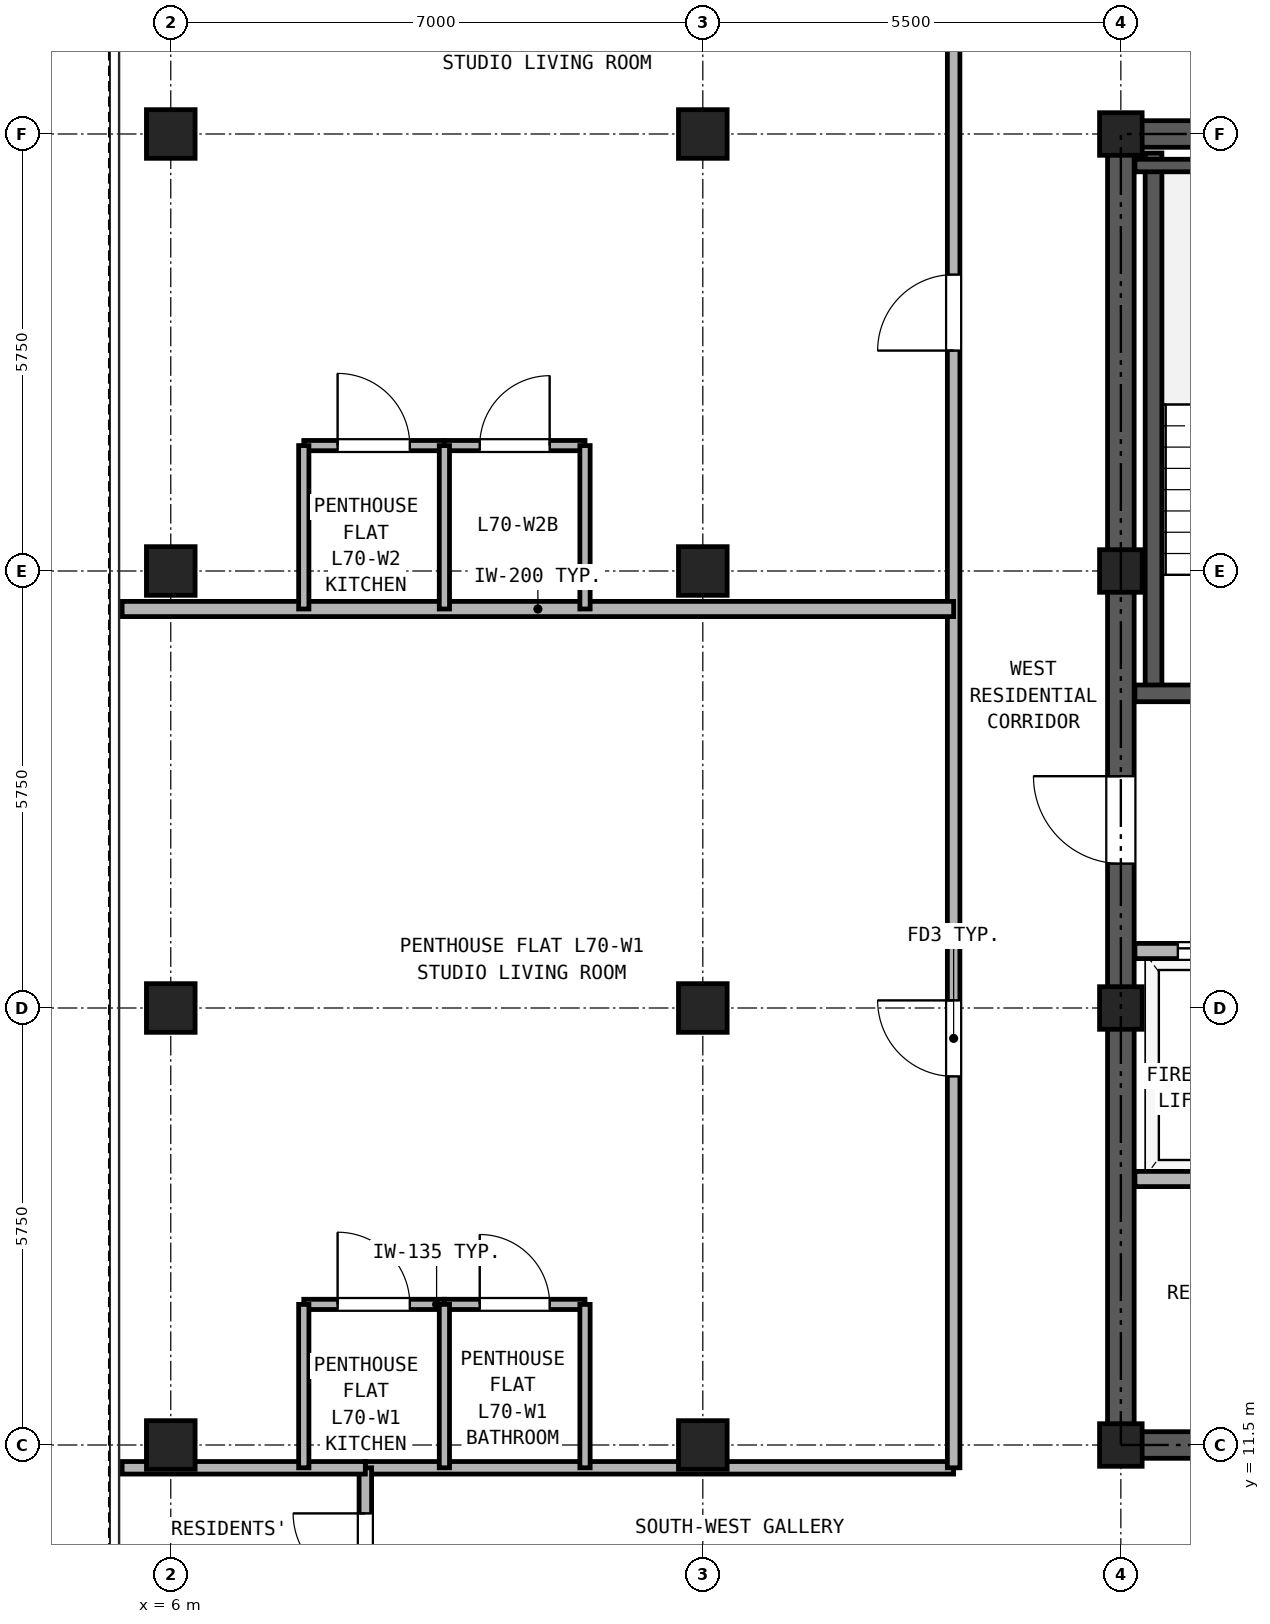
"""IFC4 building model, lengths in metres.
Left out: names, types, materials, properties, quantities, classifications, styles, units other than length and angle.
Written with IfcOpenShell. Run it as: python <this file> out.ifc"""

import sys

from ifc_helpers import new_model, si_unit, direction, frame, frame_2d, origin, origin_2d, place, context, subcontext, project, spatial, rectangle, hollow_rectangle, extrude, source, transform, mapped, element, fill, save


model = new_model("IFC4")
c1 = context("Model", 3, precision=1e-05, world=origin(), true_north=direction((0.0, 1.0)))
c2 = subcontext(c1, "Body", "Model", "MODEL_VIEW")
j1 = project(units=[si_unit("LENGTHUNIT", "METRE"), si_unit("PLANEANGLEUNIT", "RADIAN")], contexts=[c1])
p1 = place(None, origin())
s1 = spatial("IfcSite", under=j1, at=p1, CompositionType="ELEMENT")
p2 = place(p1, origin())
s2 = spatial("IfcBuilding", under=s1, at=p2, CompositionType="ELEMENT")
p3 = place(p2, frame((0.0, 0.0, 245.7)))
s3 = spatial("IfcBuildingStorey", under=s2, at=p3, CompositionType="ELEMENT", Elevation=245.7)
m1 = source(origin(), c2, "Body", "SweptSolid", [
    extrude(hollow_rectangle(XDim=0.64, YDim=0.64, WallThickness=0.035, at=origin_2d()), origin(), (0.0, 0.0, 1.0), 2.98),
])
for number, where, z_axis, x_axis in (
    (1, (6.0, 11.5, 0.0), (0.0, 0.0, 1.0), (1.0, 0.0, 0.0)),
    (2, (6.0, 17.25, 0.0), (0.0, 0.0, 1.0), (1.0, 0.0, 0.0)),
    (3, (6.0, 23.0, 0.0), (0.0, 0.0, 1.0), (1.0, 0.0, 0.0)),
    (4, (6.0, 28.75, 0.0), (0.0, 0.0, 1.0), (1.0, 0.0, 0.0)),
    (5, (13.0, 11.5, 0.0), (0.0, 0.0, 1.0), (1.0, 0.0, 0.0)),
    (6, (13.0, 17.25, 0.0), (0.0, 0.0, 1.0), (1.0, 0.0, 0.0)),
    (7, (13.0, 23.0, 0.0), (0.0, 0.0, 1.0), (1.0, 0.0, 0.0)),
    (8, (13.0, 28.75, 0.0), (0.0, 0.0, 1.0), (1.0, 0.0, 0.0)),
):
    element("IfcColumn", number, at=place(p3, frame(where, z_axis=z_axis, x_axis=x_axis)), inside=s3, PredefinedType="COLUMN", context=c2, shape_type="MappedRepresentation", body=[
        mapped(m1, transform((0.0, 0.0, 0.0), x_axis=(1.0, 0.0, 0.0), y_axis=(0.0, 1.0, 0.0), z_axis=(0.0, 0.0, 1.0), scale=1.0)),
    ])
m2 = source(origin(), c2, "Body", "SweptSolid", [
    extrude(hollow_rectangle(XDim=0.56, YDim=0.56, WallThickness=0.03, at=origin_2d()), origin(), (0.0, 0.0, 1.0), 2.98),
])
for number, where, z_axis, x_axis in (
    (9, (18.5, 11.5, 0.0), (0.0, 0.0, 1.0), (1.0, 0.0, 0.0)),
    (10, (18.5, 17.25, 0.0), (0.0, 0.0, 1.0), (1.0, 0.0, 0.0)),
    (11, (18.5, 23.0, 0.0), (0.0, 0.0, 1.0), (1.0, 0.0, 0.0)),
    (12, (18.5, 28.75, 0.0), (0.0, 0.0, 1.0), (1.0, 0.0, 0.0)),
):
    element("IfcColumn", number, at=place(p3, frame(where, z_axis=z_axis, x_axis=x_axis)), inside=s3, PredefinedType="COLUMN", context=c2, shape_type="MappedRepresentation", body=[
        mapped(m2, transform((0.0, 0.0, 0.0), x_axis=(1.0, 0.0, 0.0), y_axis=(0.0, 1.0, 0.0), z_axis=(0.0, 0.0, 1.0), scale=1.0)),
    ])
p4 = place(p3, frame((18.325, 11.5, 0.0), z_axis=(0.0, 0.0, 1.0), x_axis=(1.0, 0.0, 0.0)))
e13 = element("IfcWall", 13, at=p4, inside=s3, PredefinedType="SHEAR", context=c2, shape_type="SweptSolid", body=[
    extrude(rectangle(XDim=10.35, YDim=0.35, at=frame_2d((5.175, 0.0))), origin(), (0.0, 0.0, 1.0), 2.98),
])
p5 = place(p4, frame((1.775, 0.0, 0.0)))
e14 = element("IfcOpeningElement", 14, at=p5, cuts=e13, PredefinedType="OPENING", context=c2, shape_type="SweptSolid", body=[
    extrude(rectangle(XDim=0.95, YDim=2.15, at=frame_2d((0.475, 1.075))), frame((0.0, 0.185, 0.0), z_axis=(0.0, -1.0, 0.0), x_axis=(1.0, 0.0, 0.0)), (0.0, 0.0, 1.0), 0.37),
])
p6 = place(p4, frame((5.275, 0.0, 0.0)))
e15 = element("IfcOpeningElement", 15, at=p6, cuts=e13, PredefinedType="OPENING", context=c2, shape_type="SweptSolid", body=[
    extrude(rectangle(XDim=0.95, YDim=2.15, at=frame_2d((0.475, 1.075))), frame((0.0, 0.185, 0.0), z_axis=(0.0, -1.0, 0.0), x_axis=(1.0, 0.0, 0.0)), (0.0, 0.0, 1.0), 0.37),
])
p7 = place(p4, frame((8.175, 0.0, 0.0)))
e16 = element("IfcOpeningElement", 16, at=p7, cuts=e13, PredefinedType="OPENING", context=c2, shape_type="SweptSolid", body=[
    extrude(rectangle(XDim=1.1, YDim=2.25, at=frame_2d((0.55, 1.125))), frame((0.0, 0.185, 0.0), z_axis=(0.0, -1.0, 0.0), x_axis=(1.0, 0.0, 0.0)), (0.0, 0.0, 1.0), 0.37),
])
p8 = place(p3, frame((18.325, 28.75, 0.0), z_axis=(0.0, 0.0, 1.0), x_axis=(1.0, 0.0, 0.0)))
e17 = element("IfcWall", 17, at=p8, inside=s3, PredefinedType="SHEAR", context=c2, shape_type="SweptSolid", body=[
    extrude(rectangle(XDim=10.35, YDim=0.35, at=frame_2d((5.175, 0.0))), origin(), (0.0, 0.0, 1.0), 2.98),
])
p9 = place(p8, frame((4.055, 0.0, 0.0)))
e18 = element("IfcOpeningElement", 18, at=p9, cuts=e17, PredefinedType="OPENING", context=c2, shape_type="SweptSolid", body=[
    extrude(rectangle(XDim=0.9, YDim=2.05, at=frame_2d((0.45, 1.025))), frame((0.0, 0.185, 0.0), z_axis=(0.0, -1.0, 0.0), x_axis=(1.0, 0.0, 0.0)), (0.0, 0.0, 1.0), 0.37),
])
p10 = place(p8, frame((5.595, 0.0, 0.0)))
e19 = element("IfcOpeningElement", 19, at=p10, cuts=e17, PredefinedType="OPENING", context=c2, shape_type="SweptSolid", body=[
    extrude(rectangle(XDim=0.9, YDim=2.05, at=frame_2d((0.45, 1.025))), frame((0.0, 0.185, 0.0), z_axis=(0.0, -1.0, 0.0), x_axis=(1.0, 0.0, 0.0)), (0.0, 0.0, 1.0), 0.37),
])
p11 = place(p3, frame((18.5, 11.675, 0.0), z_axis=(0.0, 0.0, 1.0), x_axis=(0.0, 1.0, 0.0)))
e20 = element("IfcWall", 20, at=p11, inside=s3, PredefinedType="SHEAR", context=c2, shape_type="SweptSolid", body=[
    extrude(rectangle(XDim=16.9, YDim=0.35, at=frame_2d((8.45, 0.0))), origin(), (0.0, 0.0, 1.0), 2.98),
])
p12 = place(p11, frame((7.475, 0.0, 0.0)))
e21 = element("IfcOpeningElement", 21, at=p12, cuts=e20, PredefinedType="OPENING", context=c2, shape_type="SweptSolid", body=[
    extrude(rectangle(XDim=1.15, YDim=2.2, at=frame_2d((0.575, 1.1))), frame((0.0, 0.185, 0.0), z_axis=(0.0, -1.0, 0.0), x_axis=(1.0, 0.0, 0.0)), (0.0, 0.0, 1.0), 0.37),
])
p13 = place(p3, frame((18.93, 21.39, 0.0), z_axis=(0.0, 0.0, 1.0), x_axis=(0.0, 1.0, 0.0)))
e22 = element("IfcWall", 22, at=p13, inside=s3, PredefinedType="SOLIDWALL", context=c2, shape_type="SweptSolid", body=[
    extrude(rectangle(XDim=7.11, YDim=0.22, at=frame_2d((3.555, 0.0))), origin(), (0.0, 0.0, 1.0), 2.98),
])
p14 = place(p3, frame((18.685, 28.335, 0.0), z_axis=(0.0, 0.0, 1.0), x_axis=(1.0, 0.0, 0.0)))
e23 = element("IfcWall", 23, at=p14, inside=s3, PredefinedType="PARTITIONING", context=c2, shape_type="SweptSolid", body=[
    extrude(rectangle(XDim=3.425, YDim=0.165, at=frame_2d((1.712, 0.0))), origin(), (0.0, 0.0, 1.0), 2.98),
])
p15 = place(p3, frame((18.685, 21.39, 0.0), z_axis=(0.0, 0.0, 1.0), x_axis=(1.0, 0.0, 0.0)))
e24 = element("IfcWall", 24, at=p15, inside=s3, PredefinedType="SOLIDWALL", context=c2, shape_type="SweptSolid", body=[
    extrude(rectangle(XDim=6.445, YDim=0.22, at=frame_2d((3.222, 0.0))), origin(), (0.0, 0.0, 1.0), 2.98),
])
p16 = place(p15, frame((1.165, 0.0, 0.0)))
e25 = element("IfcOpeningElement", 25, at=p16, cuts=e24, PredefinedType="OPENING", context=c2, shape_type="SweptSolid", body=[
    extrude(rectangle(XDim=1.15, YDim=2.2, at=frame_2d((0.575, 1.1))), frame((0.0, 0.12, 0.0), z_axis=(0.0, -1.0, 0.0), x_axis=(1.0, 0.0, 0.0)), (0.0, 0.0, 1.0), 0.24),
])
p17 = place(p15, frame((4.895, 0.0, 0.0)))
e26 = element("IfcOpeningElement", 26, at=p17, cuts=e24, PredefinedType="OPENING", context=c2, shape_type="SweptSolid", body=[
    extrude(rectangle(XDim=1.1, YDim=2.25, at=frame_2d((0.55, 1.125))), frame((0.0, 0.12, 0.0), z_axis=(0.0, -1.0, 0.0), x_axis=(1.0, 0.0, 0.0)), (0.0, 0.0, 1.0), 0.24),
])
p18 = place(p3, frame((18.685, 18.0, 0.0), z_axis=(0.0, 0.0, 1.0), x_axis=(1.0, 0.0, 0.0)))
e27 = element("IfcWall", 27, at=p18, inside=s3, PredefinedType="PARTITIONING", context=c2, shape_type="SweptSolid", body=[
    extrude(rectangle(XDim=9.63, YDim=0.2, at=frame_2d((4.815, 0.0))), origin(), (0.0, 0.0, 1.0), 2.98),
])
p19 = place(p18, frame((0.565, 0.0, 0.0)))
e28 = element("IfcOpeningElement", 28, at=p19, cuts=e27, PredefinedType="OPENING", context=c2, shape_type="SweptSolid", body=[
    extrude(rectangle(XDim=1.3, YDim=2.3, at=frame_2d((0.65, 1.15))), frame((0.0, 0.11, 0.0), z_axis=(0.0, -1.0, 0.0), x_axis=(1.0, 0.0, 0.0)), (0.0, 0.0, 1.0), 0.22),
])
p20 = place(p18, frame((2.665, 0.0, 0.0)))
e29 = element("IfcOpeningElement", 29, at=p20, cuts=e27, PredefinedType="OPENING", context=c2, shape_type="SweptSolid", body=[
    extrude(rectangle(XDim=1.3, YDim=2.3, at=frame_2d((0.65, 1.15))), frame((0.0, 0.11, 0.0), z_axis=(0.0, -1.0, 0.0), x_axis=(1.0, 0.0, 0.0)), (0.0, 0.0, 1.0), 0.22),
])
p21 = place(p18, frame((7.165, 0.0, 0.0)))
e30 = element("IfcOpeningElement", 30, at=p21, cuts=e27, PredefinedType="OPENING", context=c2, shape_type="SweptSolid", body=[
    extrude(rectangle(XDim=1.0, YDim=2.15, at=frame_2d((0.5, 1.075))), frame((0.0, 0.11, 0.0), z_axis=(0.0, -1.0, 0.0), x_axis=(1.0, 0.0, 0.0)), (0.0, 0.0, 1.0), 0.22),
])
p22 = place(p3, frame((18.685, 15.0, 0.0), z_axis=(0.0, 0.0, 1.0), x_axis=(1.0, 0.0, 0.0)))
e31 = element("IfcWall", 31, at=p22, inside=s3, PredefinedType="PARTITIONING", context=c2, shape_type="SweptSolid", body=[
    extrude(rectangle(XDim=9.63, YDim=0.2, at=frame_2d((4.815, 0.0))), origin(), (0.0, 0.0, 1.0), 2.98),
])
p23 = place(p3, frame((8.56, 11.2, 0.0), z_axis=(0.0, 0.0, 1.0), x_axis=(1.0, 0.0, 0.0)))
e32 = element("IfcWall", 32, at=p23, inside=s3, PredefinedType="PARTITIONING", context=c2, shape_type="SweptSolid", body=[
    extrude(rectangle(XDim=7.74, YDim=0.165, at=frame_2d((3.87, 0.0))), origin(), (0.0, 0.0, 1.0), 2.98),
])
p24 = place(p3, frame((8.56, 9.2, 0.0), z_axis=(0.0, 0.0, 1.0), x_axis=(0.0, 1.0, 0.0)))
e33 = element("IfcWall", 33, at=p24, inside=s3, PredefinedType="PARTITIONING", context=c2, shape_type="SweptSolid", body=[
    extrude(rectangle(XDim=2.0, YDim=0.165, at=frame_2d((1.0, 0.0))), origin(), (0.0, 0.0, 1.0), 2.98),
])
p25 = place(p24, frame((0.45, 0.0, 0.0)))
e34 = element("IfcOpeningElement", 34, at=p25, cuts=e33, PredefinedType="OPENING", context=c2, shape_type="SweptSolid", body=[
    extrude(rectangle(XDim=0.95, YDim=2.15, at=frame_2d((0.475, 1.075))), frame((0.0, 0.093, 0.0), z_axis=(0.0, -1.0, 0.0), x_axis=(1.0, 0.0, 0.0)), (0.0, 0.0, 1.0), 0.185),
])
p26 = place(p3, frame((16.3, 11.2, 0.0), z_axis=(0.0, 0.0, 1.0), x_axis=(0.0, 1.0, 0.0)))
e35 = element("IfcWall", 35, at=p26, inside=s3, PredefinedType="PARTITIONING", context=c2, shape_type="SweptSolid", body=[
    extrude(rectangle(XDim=23.94, YDim=0.165, at=frame_2d((11.97, 0.0))), origin(), (0.0, 0.0, 1.0), 2.98),
])
p27 = place(p26, frame((5.15, 0.0, 0.0)))
e36 = element("IfcOpeningElement", 36, at=p27, cuts=e35, PredefinedType="OPENING", context=c2, shape_type="SweptSolid", body=[
    extrude(rectangle(XDim=1.0, YDim=2.15, at=frame_2d((0.5, 1.075))), frame((0.0, 0.093, 0.0), z_axis=(0.0, -1.0, 0.0), x_axis=(1.0, 0.0, 0.0)), (0.0, 0.0, 1.0), 0.185),
])
p28 = place(p26, frame((14.7, 0.0, 0.0)))
e37 = element("IfcOpeningElement", 37, at=p28, cuts=e35, PredefinedType="OPENING", context=c2, shape_type="SweptSolid", body=[
    extrude(rectangle(XDim=1.0, YDim=2.15, at=frame_2d((0.5, 1.075))), frame((0.0, 0.093, 0.0), z_axis=(0.0, -1.0, 0.0), x_axis=(1.0, 0.0, 0.0)), (0.0, 0.0, 1.0), 0.185),
])
p29 = place(p3, frame((5.36, 11.2, 0.0), z_axis=(0.0, 0.0, 1.0), x_axis=(1.0, 0.0, 0.0)))
e38 = element("IfcWall", 38, at=p29, inside=s3, PredefinedType="PARTITIONING", context=c2, shape_type="SweptSolid", body=[
    extrude(rectangle(XDim=3.2, YDim=0.165, at=frame_2d((1.6, 0.0))), origin(), (0.0, 0.0, 1.0), 2.98),
])
p30 = place(p3, frame((7.75, 13.35, 0.0), z_axis=(0.0, 0.0, 1.0), x_axis=(1.0, 0.0, 0.0)))
e39 = element("IfcWall", 39, at=p30, inside=s3, PredefinedType="PARTITIONING", context=c2, shape_type="SweptSolid", body=[
    extrude(rectangle(XDim=1.85, YDim=0.135, at=frame_2d((0.925, 0.0))), origin(), (0.0, 0.0, 1.0), 2.98),
])
p31 = place(p30, frame((0.445, 0.0, 0.0)))
e40 = element("IfcOpeningElement", 40, at=p31, cuts=e39, PredefinedType="OPENING", context=c2, shape_type="SweptSolid", body=[
    extrude(rectangle(XDim=0.95, YDim=2.15, at=frame_2d((0.475, 1.075))), frame((0.0, 0.077, 0.0), z_axis=(0.0, -1.0, 0.0), x_axis=(1.0, 0.0, 0.0)), (0.0, 0.0, 1.0), 0.155),
])
p32 = place(p3, frame((9.6, 13.35, 0.0), z_axis=(0.0, 0.0, 1.0), x_axis=(1.0, 0.0, 0.0)))
e41 = element("IfcWall", 41, at=p32, inside=s3, PredefinedType="PARTITIONING", context=c2, shape_type="SweptSolid", body=[
    extrude(rectangle(XDim=1.85, YDim=0.135, at=frame_2d((0.925, 0.0))), origin(), (0.0, 0.0, 1.0), 2.98),
])
p33 = place(p32, frame((0.465, 0.0, 0.0)))
e42 = element("IfcOpeningElement", 42, at=p33, cuts=e41, PredefinedType="OPENING", context=c2, shape_type="SweptSolid", body=[
    extrude(rectangle(XDim=0.92, YDim=2.1, at=frame_2d((0.46, 1.05))), frame((0.0, 0.077, 0.0), z_axis=(0.0, -1.0, 0.0), x_axis=(1.0, 0.0, 0.0)), (0.0, 0.0, 1.0), 0.155),
])
for number, where, z_axis, x_axis in (
    (43, (7.75, 11.2, 0.0), (0.0, 0.0, 1.0), (0.0, 1.0, 0.0)),
    (44, (9.6, 11.2, 0.0), (0.0, 0.0, 1.0), (0.0, 1.0, 0.0)),
    (45, (11.45, 11.2, 0.0), (0.0, 0.0, 1.0), (0.0, 1.0, 0.0)),
):
    element("IfcWall", number, at=place(p3, frame(where, z_axis=z_axis, x_axis=x_axis)), inside=s3, PredefinedType="PARTITIONING", context=c2, shape_type="SweptSolid", body=[
        extrude(rectangle(XDim=2.15, YDim=0.135, at=frame_2d((1.075, 0.0))), origin(), (0.0, 0.0, 1.0), 2.98),
    ])
p34 = place(p3, frame((5.36, 22.5, 0.0), z_axis=(0.0, 0.0, 1.0), x_axis=(1.0, 0.0, 0.0)))
e46 = element("IfcWall", 46, at=p34, inside=s3, PredefinedType="PARTITIONING", context=c2, shape_type="SweptSolid", body=[
    extrude(rectangle(XDim=10.94, YDim=0.2, at=frame_2d((5.47, 0.0))), origin(), (0.0, 0.0, 1.0), 2.98),
])
p35 = place(p3, frame((7.75, 24.65, 0.0), z_axis=(0.0, 0.0, 1.0), x_axis=(1.0, 0.0, 0.0)))
e47 = element("IfcWall", 47, at=p35, inside=s3, PredefinedType="PARTITIONING", context=c2, shape_type="SweptSolid", body=[
    extrude(rectangle(XDim=1.85, YDim=0.135, at=frame_2d((0.925, 0.0))), origin(), (0.0, 0.0, 1.0), 2.98),
])
p36 = place(p35, frame((0.445, 0.0, 0.0)))
e48 = element("IfcOpeningElement", 48, at=p36, cuts=e47, PredefinedType="OPENING", context=c2, shape_type="SweptSolid", body=[
    extrude(rectangle(XDim=0.95, YDim=2.15, at=frame_2d((0.475, 1.075))), frame((0.0, 0.077, 0.0), z_axis=(0.0, -1.0, 0.0), x_axis=(1.0, 0.0, 0.0)), (0.0, 0.0, 1.0), 0.155),
])
p37 = place(p3, frame((9.6, 24.65, 0.0), z_axis=(0.0, 0.0, 1.0), x_axis=(1.0, 0.0, 0.0)))
e49 = element("IfcWall", 49, at=p37, inside=s3, PredefinedType="PARTITIONING", context=c2, shape_type="SweptSolid", body=[
    extrude(rectangle(XDim=1.85, YDim=0.135, at=frame_2d((0.925, 0.0))), origin(), (0.0, 0.0, 1.0), 2.98),
])
p38 = place(p37, frame((0.465, 0.0, 0.0)))
e50 = element("IfcOpeningElement", 50, at=p38, cuts=e49, PredefinedType="OPENING", context=c2, shape_type="SweptSolid", body=[
    extrude(rectangle(XDim=0.92, YDim=2.1, at=frame_2d((0.46, 1.05))), frame((0.0, 0.077, 0.0), z_axis=(0.0, -1.0, 0.0), x_axis=(1.0, 0.0, 0.0)), (0.0, 0.0, 1.0), 0.155),
])
for number, where, z_axis, x_axis in (
    (51, (7.75, 22.5, 0.0), (0.0, 0.0, 1.0), (0.0, 1.0, 0.0)),
    (52, (9.6, 22.5, 0.0), (0.0, 0.0, 1.0), (0.0, 1.0, 0.0)),
    (53, (11.45, 22.5, 0.0), (0.0, 0.0, 1.0), (0.0, 1.0, 0.0)),
):
    element("IfcWall", number, at=place(p3, frame(where, z_axis=z_axis, x_axis=x_axis)), inside=s3, PredefinedType="PARTITIONING", context=c2, shape_type="SweptSolid", body=[
        extrude(rectangle(XDim=2.15, YDim=0.135, at=frame_2d((1.075, 0.0))), origin(), (0.0, 0.0, 1.0), 2.98),
    ])
p39 = place(p19, origin())
e54 = element("IfcDoor", 54, at=p39, inside=s3, OperationType="DOUBLE_DOOR_SLIDING", PredefinedType="DOOR", context=c2, shape_type="SweptSolid", body=[
    extrude(rectangle(XDim=1.3, YDim=2.3, at=frame_2d((0.65, 1.15))), frame((0.0, 0.025, 0.0), z_axis=(0.0, -1.0, 0.0), x_axis=(1.0, 0.0, 0.0)), (0.0, 0.0, 1.0), 0.05),
])
fill(e28, e54)
p40 = place(p12, frame((1.15, 0.0, 0.0), z_axis=(0.0, 0.0, 1.0), x_axis=(-1.0, 0.0, 0.0)))
e55 = element("IfcDoor", 55, at=p40, inside=s3, OperationType="SINGLE_SWING_RIGHT", PredefinedType="DOOR", context=c2, shape_type="SweptSolid", body=[
    extrude(rectangle(XDim=1.15, YDim=2.2, at=frame_2d((0.575, 1.1))), frame((0.0, 0.025, 0.0), z_axis=(0.0, -1.0, 0.0), x_axis=(1.0, 0.0, 0.0)), (0.0, 0.0, 1.0), 0.05),
])
fill(e21, e55)
p41 = place(p25, frame((0.95, 0.0, 0.0), z_axis=(0.0, 0.0, 1.0), x_axis=(-1.0, 0.0, 0.0)))
e56 = element("IfcDoor", 56, at=p41, inside=s3, OperationType="SINGLE_SWING_RIGHT", PredefinedType="DOOR", context=c2, shape_type="SweptSolid", body=[
    extrude(rectangle(XDim=0.95, YDim=2.15, at=frame_2d((0.475, 1.075))), frame((0.0, 0.025, 0.0), z_axis=(0.0, -1.0, 0.0), x_axis=(1.0, 0.0, 0.0)), (0.0, 0.0, 1.0), 0.05),
])
fill(e34, e56)
p42 = place(p31, origin())
e57 = element("IfcDoor", 57, at=p42, inside=s3, OperationType="SINGLE_SWING_LEFT", PredefinedType="DOOR", context=c2, shape_type="SweptSolid", body=[
    extrude(rectangle(XDim=0.95, YDim=2.15, at=frame_2d((0.475, 1.075))), frame((0.0, 0.025, 0.0), z_axis=(0.0, -1.0, 0.0), x_axis=(1.0, 0.0, 0.0)), (0.0, 0.0, 1.0), 0.05),
])
fill(e40, e57)
p43 = place(p33, origin())
e58 = element("IfcDoor", 58, at=p43, inside=s3, OperationType="SINGLE_SWING_LEFT", PredefinedType="DOOR", context=c2, shape_type="SweptSolid", body=[
    extrude(rectangle(XDim=0.92, YDim=2.1, at=frame_2d((0.46, 1.05))), frame((0.0, 0.025, 0.0), z_axis=(0.0, -1.0, 0.0), x_axis=(1.0, 0.0, 0.0)), (0.0, 0.0, 1.0), 0.05),
])
fill(e42, e58)
p44 = place(p27, origin())
e59 = element("IfcDoor", 59, at=p44, inside=s3, OperationType="SINGLE_SWING_RIGHT", PredefinedType="DOOR", context=c2, shape_type="SweptSolid", body=[
    extrude(rectangle(XDim=1.0, YDim=2.15, at=frame_2d((0.5, 1.075))), frame((0.0, 0.025, 0.0), z_axis=(0.0, -1.0, 0.0), x_axis=(1.0, 0.0, 0.0)), (0.0, 0.0, 1.0), 0.05),
])
fill(e36, e59)
p45 = place(p36, origin())
e60 = element("IfcDoor", 60, at=p45, inside=s3, OperationType="SINGLE_SWING_LEFT", PredefinedType="DOOR", context=c2, shape_type="SweptSolid", body=[
    extrude(rectangle(XDim=0.95, YDim=2.15, at=frame_2d((0.475, 1.075))), frame((0.0, 0.025, 0.0), z_axis=(0.0, -1.0, 0.0), x_axis=(1.0, 0.0, 0.0)), (0.0, 0.0, 1.0), 0.05),
])
fill(e48, e60)
p46 = place(p38, origin())
e61 = element("IfcDoor", 61, at=p46, inside=s3, OperationType="SINGLE_SWING_RIGHT", PredefinedType="DOOR", context=c2, shape_type="SweptSolid", body=[
    extrude(rectangle(XDim=0.92, YDim=2.1, at=frame_2d((0.46, 1.05))), frame((0.0, 0.025, 0.0), z_axis=(0.0, -1.0, 0.0), x_axis=(1.0, 0.0, 0.0)), (0.0, 0.0, 1.0), 0.05),
])
fill(e50, e61)
p47 = place(p28, origin())
e62 = element("IfcDoor", 62, at=p47, inside=s3, OperationType="SINGLE_SWING_LEFT", PredefinedType="DOOR", context=c2, shape_type="SweptSolid", body=[
    extrude(rectangle(XDim=1.0, YDim=2.15, at=frame_2d((0.5, 1.075))), frame((0.0, 0.025, 0.0), z_axis=(0.0, -1.0, 0.0), x_axis=(1.0, 0.0, 0.0)), (0.0, 0.0, 1.0), 0.05),
])
fill(e37, e62)
save(model, sys.argv[1])
